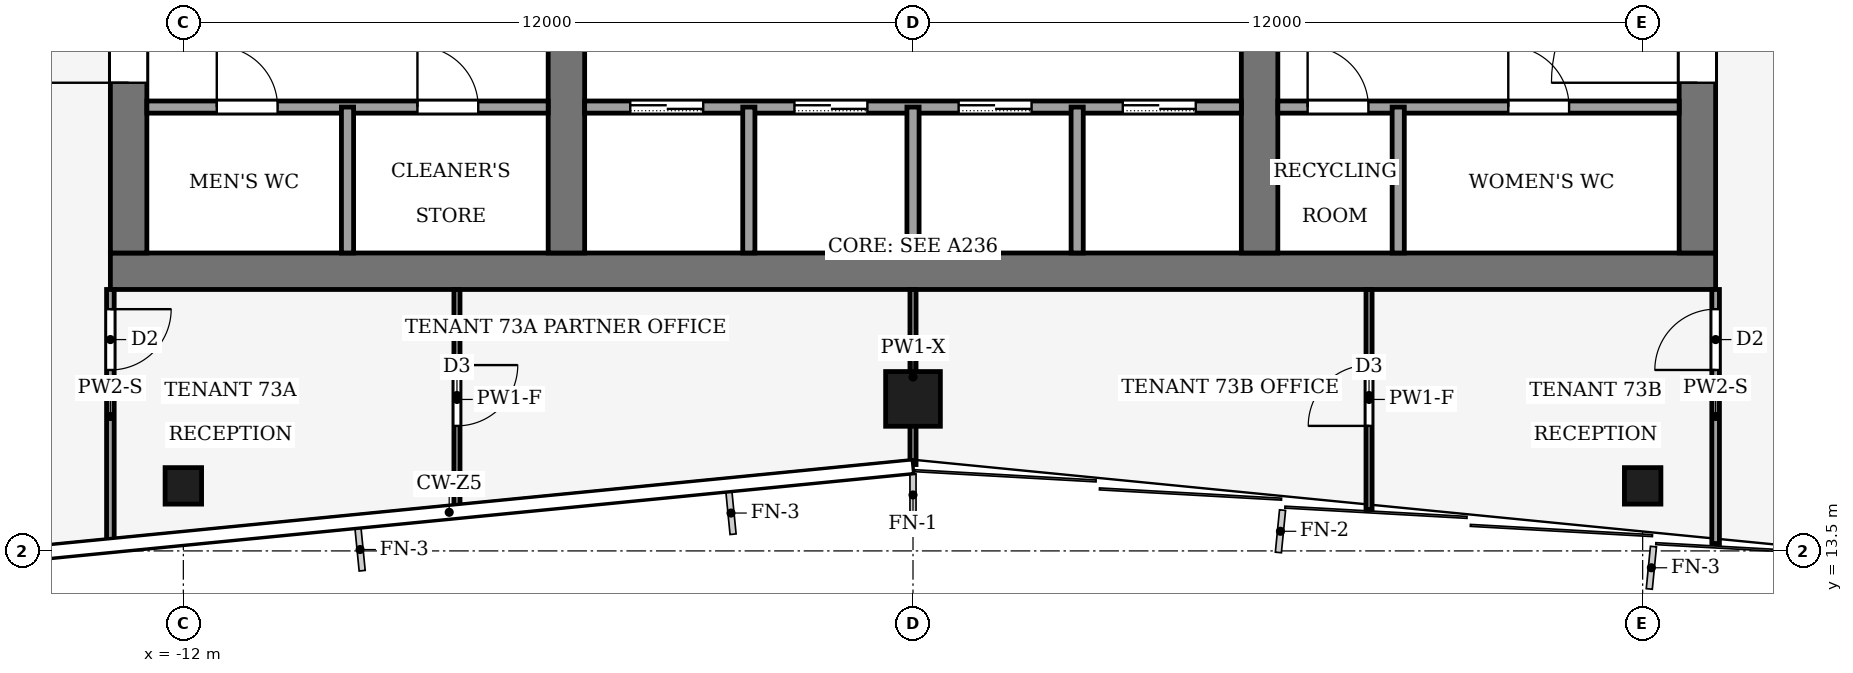
"""IFC4 building model, lengths in metres.
Left out: names, types, materials, properties, quantities, classifications, styles, units other than length and angle.
Written with IfcOpenShell. Run it as: python <this file> out.ifc"""

import sys

from ifc_helpers import new_model, si_unit, direction, frame, frame_2d, origin, origin_2d, place, context, subcontext, project, spatial, rectangle, hollow_rectangle, extrude, element, fill, save


model = new_model("IFC4")
c1 = context("Model", 3, precision=1e-05, world=origin(), true_north=direction((0.0, 1.0)))
c2 = subcontext(c1, "Body", "Model", "MODEL_VIEW")
j1 = project(units=[si_unit("LENGTHUNIT", "METRE"), si_unit("PLANEANGLEUNIT", "RADIAN")], contexts=[c1])
p1 = place(None, origin())
s1 = spatial("IfcSite", under=j1, at=p1, CompositionType="ELEMENT")
p2 = place(p1, origin())
s2 = spatial("IfcBuilding", under=s1, at=p2, CompositionType="ELEMENT")
p3 = place(p2, frame((0.0, 0.0, 318.0)))
s3 = spatial("IfcBuildingStorey", under=s2, at=p3, CompositionType="ELEMENT", Elevation=318.0)
p4 = place(p3, frame((-13.2, 18.1, -0.13), z_axis=(0.0, 0.0, 1.0), x_axis=(1.0, 0.0, 0.0)))
e1 = element("IfcWall", 1, at=p4, inside=s3, PredefinedType="SHEAR", context=c2, shape_type="SweptSolid", body=[
    extrude(rectangle(XDim=26.4, YDim=0.6, at=frame_2d((13.2, 0.0))), origin(), (0.0, 0.0, 1.0), 4.0),
])
p5 = place(p3, frame((-12.9, 18.4, -0.13), z_axis=(0.0, 0.0, 1.0), x_axis=(0.0, 1.0, 0.0)))
e2 = element("IfcWall", 2, at=p5, inside=s3, PredefinedType="SHEAR", context=c2, shape_type="SweptSolid", body=[
    extrude(rectangle(XDim=19.2, YDim=0.6, at=frame_2d((9.6, 0.0))), origin(), (0.0, 0.0, 1.0), 4.0),
])
p6 = place(p5, frame((2.8, 0.0, 0.13)))
e3 = element("IfcOpeningElement", 3, at=p6, cuts=e2, PredefinedType="OPENING", context=c2, shape_type="SweptSolid", body=[
    extrude(rectangle(XDim=2.4, YDim=2.4, at=frame_2d((1.2, 1.2))), frame((0.0, 0.31, 0.0), z_axis=(0.0, -1.0, 0.0), x_axis=(1.0, 0.0, 0.0)), (0.0, 0.0, 1.0), 0.62),
])
p7 = place(p5, frame((13.4, 0.0, 0.13)))
e4 = element("IfcOpeningElement", 4, at=p7, cuts=e2, PredefinedType="OPENING", context=c2, shape_type="SweptSolid", body=[
    extrude(rectangle(XDim=1.4, YDim=2.2, at=frame_2d((0.7, 1.1))), frame((0.0, 0.31, 0.0), z_axis=(0.0, -1.0, 0.0), x_axis=(1.0, 0.0, 0.0)), (0.0, 0.0, 1.0), 0.62),
])
p8 = place(p3, frame((12.9, 18.4, -0.13), z_axis=(0.0, 0.0, 1.0), x_axis=(0.0, 1.0, 0.0)))
e5 = element("IfcWall", 5, at=p8, inside=s3, PredefinedType="SHEAR", context=c2, shape_type="SweptSolid", body=[
    extrude(rectangle(XDim=19.2, YDim=0.6, at=frame_2d((9.6, 0.0))), origin(), (0.0, 0.0, 1.0), 4.0),
])
p9 = place(p8, frame((2.8, 0.0, 0.13)))
e6 = element("IfcOpeningElement", 6, at=p9, cuts=e5, PredefinedType="OPENING", context=c2, shape_type="SweptSolid", body=[
    extrude(rectangle(XDim=2.4, YDim=2.4, at=frame_2d((1.2, 1.2))), frame((0.0, 0.31, 0.0), z_axis=(0.0, -1.0, 0.0), x_axis=(1.0, 0.0, 0.0)), (0.0, 0.0, 1.0), 0.62),
])
p10 = place(p8, frame((13.3, 0.0, 0.13)))
e7 = element("IfcOpeningElement", 7, at=p10, cuts=e5, PredefinedType="OPENING", context=c2, shape_type="SweptSolid", body=[
    extrude(rectangle(XDim=2.4, YDim=2.4, at=frame_2d((1.2, 1.2))), frame((0.0, 0.31, 0.0), z_axis=(0.0, -1.0, 0.0), x_axis=(1.0, 0.0, 0.0)), (0.0, 0.0, 1.0), 0.62),
])
p11 = place(p3, frame((-5.7, 18.4, -0.13), z_axis=(0.0, 0.0, 1.0), x_axis=(0.0, 1.0, 0.0)))
e8 = element("IfcWall", 8, at=p11, inside=s3, PredefinedType="SHEAR", context=c2, shape_type="SweptSolid", body=[
    extrude(rectangle(XDim=19.2, YDim=0.6, at=frame_2d((9.6, 0.0))), origin(), (0.0, 0.0, 1.0), 4.0),
])
p12 = place(p11, frame((8.35, 0.0, 0.13)))
e9 = element("IfcOpeningElement", 9, at=p12, cuts=e8, PredefinedType="OPENING", context=c2, shape_type="SweptSolid", body=[
    extrude(rectangle(XDim=0.9, YDim=2.1, at=frame_2d((0.45, 1.05))), frame((0.0, 0.31, 0.0), z_axis=(0.0, -1.0, 0.0), x_axis=(1.0, 0.0, 0.0)), (0.0, 0.0, 1.0), 0.62),
])
p13 = place(p3, frame((5.7, 18.4, -0.13), z_axis=(0.0, 0.0, 1.0), x_axis=(0.0, 1.0, 0.0)))
e10 = element("IfcWall", 10, at=p13, inside=s3, PredefinedType="SHEAR", context=c2, shape_type="SweptSolid", body=[
    extrude(rectangle(XDim=19.2, YDim=0.6, at=frame_2d((9.6, 0.0))), origin(), (0.0, 0.0, 1.0), 4.0),
])
p14 = place(p13, frame((8.35, 0.0, 0.13)))
e11 = element("IfcOpeningElement", 11, at=p14, cuts=e10, PredefinedType="OPENING", context=c2, shape_type="SweptSolid", body=[
    extrude(rectangle(XDim=0.9, YDim=2.1, at=frame_2d((0.45, 1.05))), frame((0.0, 0.31, 0.0), z_axis=(0.0, -1.0, 0.0), x_axis=(1.0, 0.0, 0.0)), (0.0, 0.0, 1.0), 0.62),
])
p15 = place(p13, frame((13.3, 0.0, 0.13)))
e12 = element("IfcOpeningElement", 12, at=p15, cuts=e10, PredefinedType="OPENING", context=c2, shape_type="SweptSolid", body=[
    extrude(rectangle(XDim=2.4, YDim=2.4, at=frame_2d((1.2, 1.2))), frame((0.0, 0.31, 0.0), z_axis=(0.0, -1.0, 0.0), x_axis=(1.0, 0.0, 0.0)), (0.0, 0.0, 1.0), 0.62),
])
p16 = place(p3, frame((0.0, 16.0, 0.0), z_axis=(0.0, 0.0, 1.0), x_axis=(1.0, 0.0, 0.0)))
e13 = element("IfcColumn", 13, at=p16, inside=s3, PredefinedType="COLUMN", context=c2, shape_type="SweptSolid", body=[
    extrude(hollow_rectangle(XDim=0.9, YDim=0.9, WallThickness=0.04, at=origin_2d()), origin(), (0.0, 0.0, 1.0), 4.0),
])
for number, where, z_axis, x_axis in (
    (14, (-12.0, 14.57, 0.0), (0.0, 0.0, 1.0), (1.0, 0.0, 0.0)),
    (15, (12.0, 14.57, 0.0), (0.0, 0.0, 1.0), (1.0, 0.0, 0.0)),
):
    element("IfcColumn", number, at=place(p3, frame(where, z_axis=z_axis, x_axis=x_axis)), inside=s3, PredefinedType="COLUMN", context=c2, shape_type="SweptSolid", body=[
        extrude(hollow_rectangle(XDim=0.6, YDim=0.6, WallThickness=0.025, at=origin_2d()), origin(), (0.0, 0.0, 1.0), 4.0),
    ])
p17 = place(p3, frame((-12.6, 20.8, 0.0), z_axis=(0.0, 0.0, 1.0), x_axis=(1.0, 0.0, 0.0)))
e16 = element("IfcWall", 16, at=p17, inside=s3, PredefinedType="PARTITIONING", context=c2, shape_type="SweptSolid", body=[
    extrude(rectangle(XDim=6.6, YDim=0.2, at=frame_2d((3.3, 0.0))), origin(), (0.0, 0.0, 1.0), 3.87),
])
p18 = place(p17, frame((1.15, 0.0, 0.0)))
e17 = element("IfcOpeningElement", 17, at=p18, cuts=e16, PredefinedType="OPENING", context=c2, shape_type="SweptSolid", body=[
    extrude(rectangle(XDim=1.0, YDim=2.1, at=frame_2d((0.5, 1.05))), frame((0.0, 0.11, 0.0), z_axis=(0.0, -1.0, 0.0), x_axis=(1.0, 0.0, 0.0)), (0.0, 0.0, 1.0), 0.22),
])
p19 = place(p17, frame((4.45, 0.0, 0.0)))
e18 = element("IfcOpeningElement", 18, at=p19, cuts=e16, PredefinedType="OPENING", context=c2, shape_type="SweptSolid", body=[
    extrude(rectangle(XDim=1.0, YDim=2.1, at=frame_2d((0.5, 1.05))), frame((0.0, 0.11, 0.0), z_axis=(0.0, -1.0, 0.0), x_axis=(1.0, 0.0, 0.0)), (0.0, 0.0, 1.0), 0.22),
])
p20 = place(p3, frame((-5.4, 20.8, 0.0), z_axis=(0.0, 0.0, 1.0), x_axis=(1.0, 0.0, 0.0)))
e19 = element("IfcWall", 19, at=p20, inside=s3, PredefinedType="PARTITIONING", context=c2, shape_type="SweptSolid", body=[
    extrude(rectangle(XDim=10.8, YDim=0.2, at=frame_2d((5.4, 0.0))), origin(), (0.0, 0.0, 1.0), 3.87),
])
p21 = place(p20, frame((0.75, 0.0, 0.0)))
e20 = element("IfcOpeningElement", 20, at=p21, cuts=e19, PredefinedType="OPENING", context=c2, shape_type="SweptSolid", body=[
    extrude(rectangle(XDim=1.2, YDim=2.2, at=frame_2d((0.6, 1.1))), frame((0.0, 0.11, 0.0), z_axis=(0.0, -1.0, 0.0), x_axis=(1.0, 0.0, 0.0)), (0.0, 0.0, 1.0), 0.22),
])
p22 = place(p20, frame((3.45, 0.0, 0.0)))
e21 = element("IfcOpeningElement", 21, at=p22, cuts=e19, PredefinedType="OPENING", context=c2, shape_type="SweptSolid", body=[
    extrude(rectangle(XDim=1.2, YDim=2.2, at=frame_2d((0.6, 1.1))), frame((0.0, 0.11, 0.0), z_axis=(0.0, -1.0, 0.0), x_axis=(1.0, 0.0, 0.0)), (0.0, 0.0, 1.0), 0.22),
])
p23 = place(p20, frame((6.15, 0.0, 0.0)))
e22 = element("IfcOpeningElement", 22, at=p23, cuts=e19, PredefinedType="OPENING", context=c2, shape_type="SweptSolid", body=[
    extrude(rectangle(XDim=1.2, YDim=2.2, at=frame_2d((0.6, 1.1))), frame((0.0, 0.11, 0.0), z_axis=(0.0, -1.0, 0.0), x_axis=(1.0, 0.0, 0.0)), (0.0, 0.0, 1.0), 0.22),
])
p24 = place(p20, frame((8.85, 0.0, 0.0)))
e23 = element("IfcOpeningElement", 23, at=p24, cuts=e19, PredefinedType="OPENING", context=c2, shape_type="SweptSolid", body=[
    extrude(rectangle(XDim=1.2, YDim=2.2, at=frame_2d((0.6, 1.1))), frame((0.0, 0.11, 0.0), z_axis=(0.0, -1.0, 0.0), x_axis=(1.0, 0.0, 0.0)), (0.0, 0.0, 1.0), 0.22),
])
p25 = place(p3, frame((6.0, 20.8, 0.0), z_axis=(0.0, 0.0, 1.0), x_axis=(1.0, 0.0, 0.0)))
e24 = element("IfcWall", 24, at=p25, inside=s3, PredefinedType="PARTITIONING", context=c2, shape_type="SweptSolid", body=[
    extrude(rectangle(XDim=6.6, YDim=0.2, at=frame_2d((3.3, 0.0))), origin(), (0.0, 0.0, 1.0), 3.87),
])
p26 = place(p25, frame((0.49, 0.0, 0.0)))
e25 = element("IfcOpeningElement", 25, at=p26, cuts=e24, PredefinedType="OPENING", context=c2, shape_type="SweptSolid", body=[
    extrude(rectangle(XDim=1.0, YDim=2.1, at=frame_2d((0.5, 1.05))), frame((0.0, 0.11, 0.0), z_axis=(0.0, -1.0, 0.0), x_axis=(1.0, 0.0, 0.0)), (0.0, 0.0, 1.0), 0.22),
])
p27 = place(p25, frame((3.79, 0.0, 0.0)))
e26 = element("IfcOpeningElement", 26, at=p27, cuts=e24, PredefinedType="OPENING", context=c2, shape_type="SweptSolid", body=[
    extrude(rectangle(XDim=1.0, YDim=2.1, at=frame_2d((0.5, 1.05))), frame((0.0, 0.11, 0.0), z_axis=(0.0, -1.0, 0.0), x_axis=(1.0, 0.0, 0.0)), (0.0, 0.0, 1.0), 0.22),
])
for number, where, z_axis, x_axis in (
    (27, (-9.3, 18.4, 0.0), (0.0, 0.0, 1.0), (0.0, 1.0, 0.0)),
    (28, (-2.7, 18.4, 0.0), (0.0, 0.0, 1.0), (0.0, 1.0, 0.0)),
    (29, (0.0, 18.4, 0.0), (0.0, 0.0, 1.0), (0.0, 1.0, 0.0)),
    (30, (2.7, 18.4, 0.0), (0.0, 0.0, 1.0), (0.0, 1.0, 0.0)),
    (31, (7.98, 18.4, 0.0), (0.0, 0.0, 1.0), (0.0, 1.0, 0.0)),
):
    element("IfcWall", number, at=place(p3, frame(where, z_axis=z_axis, x_axis=x_axis)), inside=s3, PredefinedType="PARTITIONING", context=c2, shape_type="SweptSolid", body=[
        extrude(rectangle(XDim=2.4, YDim=0.2, at=frame_2d((1.2, 0.0))), origin(), (0.0, 0.0, 1.0), 3.87),
    ])
p28 = place(p3, frame((-13.2, 17.8, 0.0), z_axis=(0.0, 0.0, 1.0), x_axis=(0.0, -1.0, 0.0)))
e32 = element("IfcWall", 32, at=p28, inside=s3, PredefinedType="PARTITIONING", context=c2, shape_type="SweptSolid", body=[
    extrude(rectangle(XDim=4.178, YDim=0.125, at=frame_2d((2.089, 0.0))), origin(), (0.0, 0.0, 1.0), 3.04),
])
p29 = place(p28, frame((0.324, 0.0, 0.0)))
e33 = element("IfcOpeningElement", 33, at=p29, cuts=e32, PredefinedType="OPENING", context=c2, shape_type="SweptSolid", body=[
    extrude(rectangle(XDim=1.0, YDim=2.1, at=frame_2d((0.5, 1.05))), frame((0.0, 0.073, 0.0), z_axis=(0.0, -1.0, 0.0), x_axis=(1.0, 0.0, 0.0)), (0.0, 0.0, 1.0), 0.145),
])
p30 = place(p3, frame((13.2, 13.622, 0.0), z_axis=(0.0, 0.0, 1.0), x_axis=(0.0, 1.0, 0.0)))
e34 = element("IfcWall", 34, at=p30, inside=s3, PredefinedType="PARTITIONING", context=c2, shape_type="SweptSolid", body=[
    extrude(rectangle(XDim=4.178, YDim=0.125, at=frame_2d((2.089, 0.0))), origin(), (0.0, 0.0, 1.0), 3.04),
])
p31 = place(p30, frame((2.854, 0.0, 0.0)))
e35 = element("IfcOpeningElement", 35, at=p31, cuts=e34, PredefinedType="OPENING", context=c2, shape_type="SweptSolid", body=[
    extrude(rectangle(XDim=1.0, YDim=2.1, at=frame_2d((0.5, 1.05))), frame((0.0, 0.073, 0.0), z_axis=(0.0, -1.0, 0.0), x_axis=(1.0, 0.0, 0.0)), (0.0, 0.0, 1.0), 0.145),
])
p32 = place(p3, frame((-7.5, 17.8, 0.0), z_axis=(0.0, 0.0, 1.0), x_axis=(0.0, -1.0, 0.0)))
e36 = element("IfcWall", 36, at=p32, inside=s3, PredefinedType="PARTITIONING", context=c2, shape_type="SweptSolid", body=[
    extrude(rectangle(XDim=3.618, YDim=0.1, at=frame_2d((1.809, 0.0))), origin(), (0.0, 0.0, 1.0), 3.04),
])
p33 = place(p32, frame((1.244, 0.0, 0.0)))
e37 = element("IfcOpeningElement", 37, at=p33, cuts=e36, PredefinedType="OPENING", context=c2, shape_type="SweptSolid", body=[
    extrude(rectangle(XDim=1.0, YDim=2.1, at=frame_2d((0.5, 1.05))), frame((0.0, 0.06, 0.0), z_axis=(0.0, -1.0, 0.0), x_axis=(1.0, 0.0, 0.0)), (0.0, 0.0, 1.0), 0.12),
])
p34 = place(p3, frame((0.0, 14.92, 0.0), z_axis=(0.0, 0.0, 1.0), x_axis=(0.0, 1.0, 0.0)))
e38 = element("IfcWall", 38, at=p34, inside=s3, PredefinedType="PARTITIONING", context=c2, shape_type="SweptSolid", body=[
    extrude(rectangle(XDim=2.88, YDim=0.1, at=frame_2d((1.44, 0.0))), origin(), (0.0, 0.0, 1.0), 3.54),
])
p35 = place(p3, frame((7.5, 14.182, 0.0), z_axis=(0.0, 0.0, 1.0), x_axis=(0.0, 1.0, 0.0)))
e39 = element("IfcWall", 39, at=p35, inside=s3, PredefinedType="PARTITIONING", context=c2, shape_type="SweptSolid", body=[
    extrude(rectangle(XDim=3.618, YDim=0.1, at=frame_2d((1.809, 0.0))), origin(), (0.0, 0.0, 1.0), 3.04),
])
p36 = place(p35, frame((1.374, 0.0, 0.0)))
e40 = element("IfcOpeningElement", 40, at=p36, cuts=e39, PredefinedType="OPENING", context=c2, shape_type="SweptSolid", body=[
    extrude(rectangle(XDim=1.0, YDim=2.1, at=frame_2d((0.5, 1.05))), frame((0.0, 0.06, 0.0), z_axis=(0.0, -1.0, 0.0), x_axis=(1.0, 0.0, 0.0)), (0.0, 0.0, 1.0), 0.12),
])
p37 = place(p21, origin())
e41 = element("IfcDoor", 41, at=p37, inside=s3, OperationType="SLIDING_TO_LEFT", PredefinedType="DOOR", context=c2, shape_type="SweptSolid", body=[
    extrude(rectangle(XDim=1.2, YDim=2.2, at=frame_2d((0.6, 1.1))), frame((0.0, 0.025, 0.0), z_axis=(0.0, -1.0, 0.0), x_axis=(1.0, 0.0, 0.0)), (0.0, 0.0, 1.0), 0.05),
])
fill(e20, e41)
p38 = place(p22, origin())
e42 = element("IfcDoor", 42, at=p38, inside=s3, OperationType="SLIDING_TO_LEFT", PredefinedType="DOOR", context=c2, shape_type="SweptSolid", body=[
    extrude(rectangle(XDim=1.2, YDim=2.2, at=frame_2d((0.6, 1.1))), frame((0.0, 0.025, 0.0), z_axis=(0.0, -1.0, 0.0), x_axis=(1.0, 0.0, 0.0)), (0.0, 0.0, 1.0), 0.05),
])
fill(e21, e42)
p39 = place(p23, origin())
e43 = element("IfcDoor", 43, at=p39, inside=s3, OperationType="SLIDING_TO_LEFT", PredefinedType="DOOR", context=c2, shape_type="SweptSolid", body=[
    extrude(rectangle(XDim=1.2, YDim=2.2, at=frame_2d((0.6, 1.1))), frame((0.0, 0.025, 0.0), z_axis=(0.0, -1.0, 0.0), x_axis=(1.0, 0.0, 0.0)), (0.0, 0.0, 1.0), 0.05),
])
fill(e22, e43)
p40 = place(p24, origin())
e44 = element("IfcDoor", 44, at=p40, inside=s3, OperationType="SLIDING_TO_LEFT", PredefinedType="DOOR", context=c2, shape_type="SweptSolid", body=[
    extrude(rectangle(XDim=1.2, YDim=2.2, at=frame_2d((0.6, 1.1))), frame((0.0, 0.025, 0.0), z_axis=(0.0, -1.0, 0.0), x_axis=(1.0, 0.0, 0.0)), (0.0, 0.0, 1.0), 0.05),
])
fill(e23, e44)
p41 = place(p18, origin())
e45 = element("IfcDoor", 45, at=p41, inside=s3, OperationType="SINGLE_SWING_LEFT", PredefinedType="DOOR", context=c2, shape_type="SweptSolid", body=[
    extrude(rectangle(XDim=1.0, YDim=2.1, at=frame_2d((0.5, 1.05))), frame((0.0, 0.025, 0.0), z_axis=(0.0, -1.0, 0.0), x_axis=(1.0, 0.0, 0.0)), (0.0, 0.0, 1.0), 0.05),
])
fill(e17, e45)
p42 = place(p19, origin())
e46 = element("IfcDoor", 46, at=p42, inside=s3, OperationType="SINGLE_SWING_LEFT", PredefinedType="DOOR", context=c2, shape_type="SweptSolid", body=[
    extrude(rectangle(XDim=1.0, YDim=2.1, at=frame_2d((0.5, 1.05))), frame((0.0, 0.025, 0.0), z_axis=(0.0, -1.0, 0.0), x_axis=(1.0, 0.0, 0.0)), (0.0, 0.0, 1.0), 0.05),
])
fill(e18, e46)
p43 = place(p26, origin())
e47 = element("IfcDoor", 47, at=p43, inside=s3, OperationType="SINGLE_SWING_RIGHT", PredefinedType="DOOR", context=c2, shape_type="SweptSolid", body=[
    extrude(rectangle(XDim=1.0, YDim=2.1, at=frame_2d((0.5, 1.05))), frame((0.0, 0.025, 0.0), z_axis=(0.0, -1.0, 0.0), x_axis=(1.0, 0.0, 0.0)), (0.0, 0.0, 1.0), 0.05),
])
fill(e25, e47)
p44 = place(p27, origin())
e48 = element("IfcDoor", 48, at=p44, inside=s3, OperationType="SINGLE_SWING_RIGHT", PredefinedType="DOOR", context=c2, shape_type="SweptSolid", body=[
    extrude(rectangle(XDim=1.0, YDim=2.1, at=frame_2d((0.5, 1.05))), frame((0.0, 0.025, 0.0), z_axis=(0.0, -1.0, 0.0), x_axis=(1.0, 0.0, 0.0)), (0.0, 0.0, 1.0), 0.05),
])
fill(e26, e48)
p45 = place(p6, origin())
e49 = element("IfcDoor", 49, at=p45, inside=s3, OperationType="DOUBLE_DOOR_SINGLE_SWING", PredefinedType="DOOR", context=c2, shape_type="SweptSolid", body=[
    extrude(rectangle(XDim=2.4, YDim=2.4, at=frame_2d((1.2, 1.2))), frame((0.0, 0.025, 0.0), z_axis=(0.0, -1.0, 0.0), x_axis=(1.0, 0.0, 0.0)), (0.0, 0.0, 1.0), 0.05),
])
fill(e3, e49)
p46 = place(p9, origin())
e50 = element("IfcDoor", 50, at=p46, inside=s3, OperationType="DOUBLE_DOOR_SINGLE_SWING", PredefinedType="DOOR", context=c2, shape_type="SweptSolid", body=[
    extrude(rectangle(XDim=2.4, YDim=2.4, at=frame_2d((1.2, 1.2))), frame((0.0, 0.025, 0.0), z_axis=(0.0, -1.0, 0.0), x_axis=(1.0, 0.0, 0.0)), (0.0, 0.0, 1.0), 0.05),
])
fill(e6, e50)
p47 = place(p29, origin())
e51 = element("IfcDoor", 51, at=p47, inside=s3, OperationType="SINGLE_SWING_LEFT", PredefinedType="DOOR", context=c2, shape_type="SweptSolid", body=[
    extrude(rectangle(XDim=1.0, YDim=2.1, at=frame_2d((0.5, 1.05))), frame((0.0, 0.025, 0.0), z_axis=(0.0, -1.0, 0.0), x_axis=(1.0, 0.0, 0.0)), (0.0, 0.0, 1.0), 0.05),
])
fill(e33, e51)
p48 = place(p31, origin())
e52 = element("IfcDoor", 52, at=p48, inside=s3, OperationType="SINGLE_SWING_RIGHT", PredefinedType="DOOR", context=c2, shape_type="SweptSolid", body=[
    extrude(rectangle(XDim=1.0, YDim=2.1, at=frame_2d((0.5, 1.05))), frame((0.0, 0.025, 0.0), z_axis=(0.0, -1.0, 0.0), x_axis=(1.0, 0.0, 0.0)), (0.0, 0.0, 1.0), 0.05),
])
fill(e35, e52)
p49 = place(p33, origin())
e53 = element("IfcDoor", 53, at=p49, inside=s3, OperationType="SINGLE_SWING_LEFT", PredefinedType="DOOR", context=c2, shape_type="SweptSolid", body=[
    extrude(rectangle(XDim=1.0, YDim=2.1, at=frame_2d((0.5, 1.05))), frame((0.0, 0.025, 0.0), z_axis=(0.0, -1.0, 0.0), x_axis=(1.0, 0.0, 0.0)), (0.0, 0.0, 1.0), 0.05),
])
fill(e37, e53)
p50 = place(p36, origin())
e54 = element("IfcDoor", 54, at=p50, inside=s3, OperationType="SINGLE_SWING_RIGHT", PredefinedType="DOOR", context=c2, shape_type="SweptSolid", body=[
    extrude(rectangle(XDim=1.0, YDim=2.1, at=frame_2d((0.5, 1.05))), frame((0.0, 0.025, 0.0), z_axis=(0.0, -1.0, 0.0), x_axis=(1.0, 0.0, 0.0)), (0.0, 0.0, 1.0), 0.05),
])
fill(e40, e54)
save(model, sys.argv[1])
